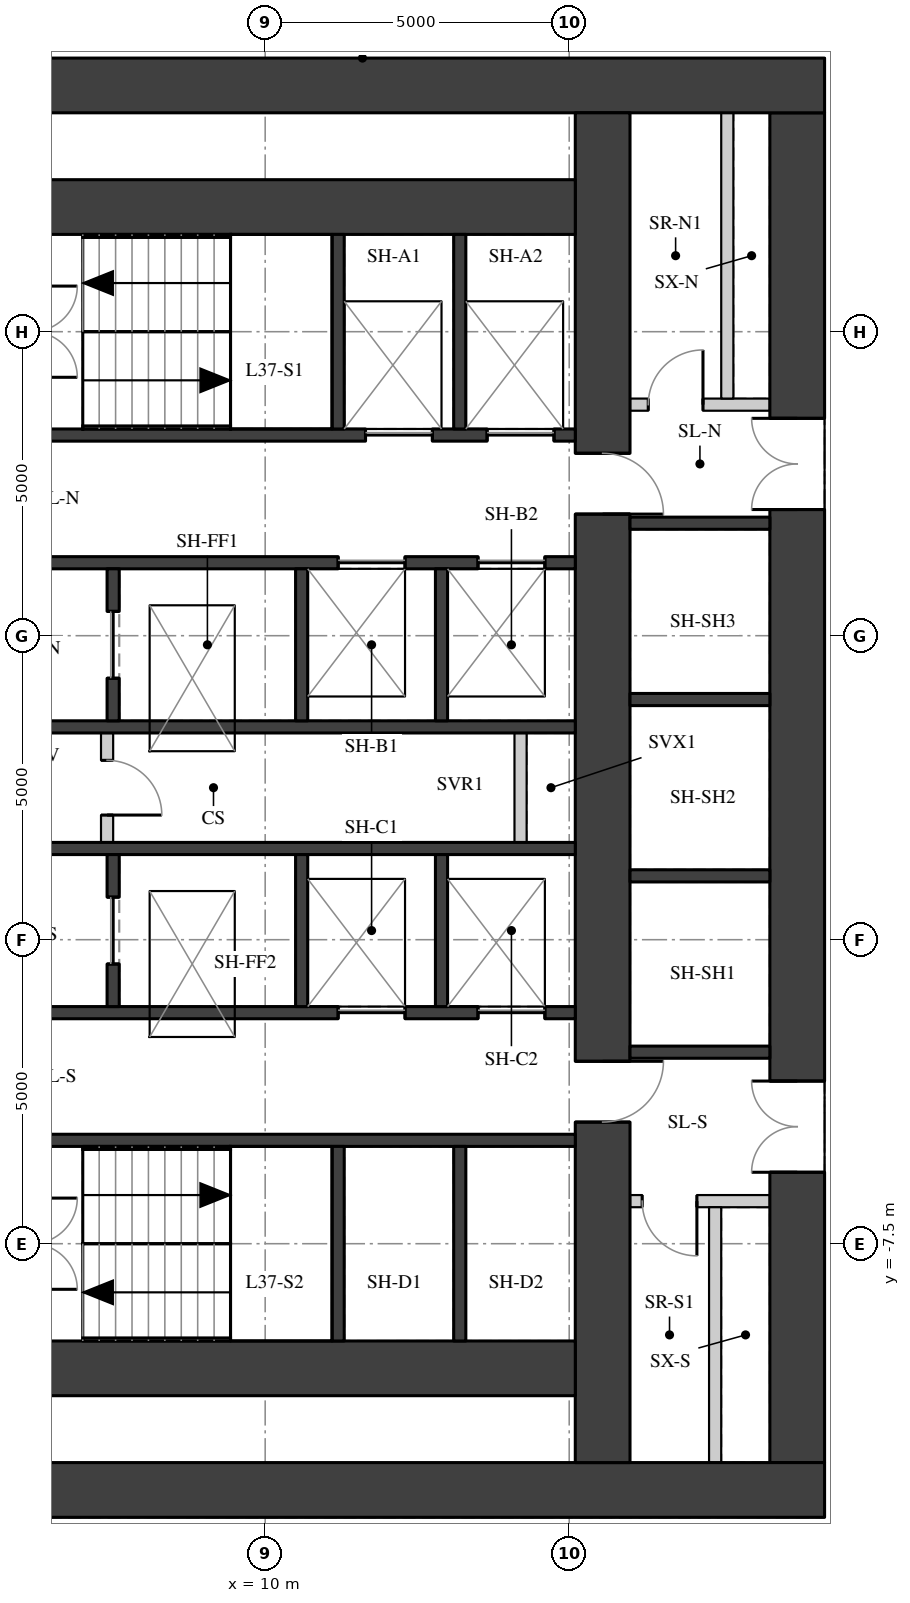
"""IFC4 building model, lengths in metres.
Left out: names, types, materials, properties, quantities, classifications, styles, units other than length and angle.
Written with IfcOpenShell. Run it as: python <this file> out.ifc"""

import sys

from ifc_helpers import new_model, si_unit, direction, frame, frame_2d, origin, place, context, subcontext, project, spatial, rectangle, extrude, element, fill, save


model = new_model("IFC4")
c1 = context("Model", 3, precision=1e-05, world=origin(), true_north=direction((0.0, 1.0)))
c2 = subcontext(c1, "Body", "Model", "MODEL_VIEW")
j1 = project(units=[si_unit("LENGTHUNIT", "METRE"), si_unit("PLANEANGLEUNIT", "RADIAN")], contexts=[c1])
p1 = place(None, origin())
s1 = spatial("IfcSite", under=j1, at=p1, CompositionType="ELEMENT")
p2 = place(p1, origin())
s2 = spatial("IfcBuilding", under=s1, at=p2, CompositionType="ELEMENT")
p3 = place(p2, frame((0.0, 0.0, 131.8)))
s3 = spatial("IfcBuildingStorey", under=s2, at=p3, CompositionType="ELEMENT", Elevation=131.8)
p4 = place(p3, frame((18.75, -11.1, 0.0), z_axis=(0.0, 0.0, 1.0), x_axis=(0.0, 1.0, 0.0)))
e1 = element("IfcWall", 1, at=p4, inside=s3, PredefinedType="SHEAR", context=c2, shape_type="SweptSolid", body=[
    extrude(rectangle(XDim=22.2, YDim=0.9, at=frame_2d((11.1, 0.0))), origin(), (0.0, 0.0, 1.0), 2.85),
])
p5 = place(p4, frame((15.675, 0.0, 0.0)))
e2 = element("IfcOpeningElement", 2, at=p5, cuts=e1, PredefinedType="OPENING", context=c2, shape_type="SweptSolid", body=[
    extrude(rectangle(XDim=1.5, YDim=2.1, at=frame_2d((0.75, 1.05))), frame((0.0, 0.46, 0.0), z_axis=(0.0, -1.0, 0.0), x_axis=(1.0, 0.0, 0.0)), (0.0, 0.0, 1.0), 0.92),
])
p6 = place(p4, frame((4.775, 0.0, 0.0)))
e3 = element("IfcOpeningElement", 3, at=p6, cuts=e1, PredefinedType="OPENING", context=c2, shape_type="SweptSolid", body=[
    extrude(rectangle(XDim=1.5, YDim=2.1, at=frame_2d((0.75, 1.05))), frame((0.0, 0.46, 0.0), z_axis=(0.0, -1.0, 0.0), x_axis=(1.0, 0.0, 0.0)), (0.0, 0.0, 1.0), 0.92),
])
for number, where, z_axis, x_axis in (
    (4, (4.0, 11.55, 0.0), (0.0, 0.0, 1.0), (1.0, 0.0, 0.0)),
    (5, (4.0, -11.55, 0.0), (0.0, 0.0, 1.0), (1.0, 0.0, 0.0)),
):
    element("IfcWall", number, at=place(p3, frame(where, z_axis=z_axis, x_axis=x_axis)), inside=s3, PredefinedType="SHEAR", context=c2, shape_type="SweptSolid", body=[
        extrude(rectangle(XDim=15.2, YDim=0.9, at=frame_2d((7.6, 0.0))), origin(), (0.0, 0.0, 1.0), 2.85),
    ])
p7 = place(p3, frame((15.55, -11.1, 0.0), z_axis=(0.0, 0.0, 1.0), x_axis=(0.0, 1.0, 0.0)))
e6 = element("IfcWall", 6, at=p7, inside=s3, PredefinedType="SHEAR", context=c2, shape_type="SweptSolid", body=[
    extrude(rectangle(XDim=22.2, YDim=0.9, at=frame_2d((11.1, 0.0))), origin(), (0.0, 0.0, 1.0), 2.85),
])
p8 = place(p7, frame((15.6, 0.0, 0.0)))
e7 = element("IfcOpeningElement", 7, at=p8, cuts=e6, PredefinedType="OPENING", context=c2, shape_type="SweptSolid", body=[
    extrude(rectangle(XDim=1.0, YDim=2.1, at=frame_2d((0.5, 1.05))), frame((0.0, 0.46, 0.0), z_axis=(0.0, -1.0, 0.0), x_axis=(1.0, 0.0, 0.0)), (0.0, 0.0, 1.0), 0.92),
])
p9 = place(p7, frame((5.6, 0.0, 0.0)))
e8 = element("IfcOpeningElement", 8, at=p9, cuts=e6, PredefinedType="OPENING", context=c2, shape_type="SweptSolid", body=[
    extrude(rectangle(XDim=1.0, YDim=2.1, at=frame_2d((0.5, 1.05))), frame((0.0, 0.46, 0.0), z_axis=(0.0, -1.0, 0.0), x_axis=(1.0, 0.0, 0.0)), (0.0, 0.0, 1.0), 0.92),
])
for number, where, z_axis, x_axis in (
    (9, (4.9, 9.55, 0.0), (0.0, 0.0, 1.0), (1.0, 0.0, 0.0)),
    (10, (4.9, -9.55, 0.0), (0.0, 0.0, 1.0), (1.0, 0.0, 0.0)),
):
    element("IfcWall", number, at=place(p3, frame(where, z_axis=z_axis, x_axis=x_axis)), inside=s3, PredefinedType="SHEAR", context=c2, shape_type="SweptSolid", body=[
        extrude(rectangle(XDim=10.2, YDim=0.9, at=frame_2d((5.1, 0.0))), origin(), (0.0, 0.0, 1.0), 2.85),
    ])
p10 = place(p3, frame((4.9, 5.8, 0.0), z_axis=(0.0, 0.0, 1.0), x_axis=(1.0, 0.0, 0.0)))
e11 = element("IfcWall", 11, at=p10, inside=s3, PredefinedType="SHEAR", context=c2, shape_type="SweptSolid", body=[
    extrude(rectangle(XDim=10.2, YDim=0.2, at=frame_2d((5.1, 0.0))), origin(), (0.0, 0.0, 1.0), 2.85),
])
p11 = place(p10, frame((6.75, 0.0, 0.0)))
e12 = element("IfcOpeningElement", 12, at=p11, cuts=e11, PredefinedType="OPENING", context=c2, shape_type="SweptSolid", body=[
    extrude(rectangle(XDim=1.1, YDim=2.1, at=frame_2d((0.55, 1.05))), frame((0.0, 0.11, 0.0), z_axis=(0.0, -1.0, 0.0), x_axis=(1.0, 0.0, 0.0)), (0.0, 0.0, 1.0), 0.22),
])
p12 = place(p10, frame((8.75, 0.0, 0.0)))
e13 = element("IfcOpeningElement", 13, at=p12, cuts=e11, PredefinedType="OPENING", context=c2, shape_type="SweptSolid", body=[
    extrude(rectangle(XDim=1.1, YDim=2.1, at=frame_2d((0.55, 1.05))), frame((0.0, 0.11, 0.0), z_axis=(0.0, -1.0, 0.0), x_axis=(1.0, 0.0, 0.0)), (0.0, 0.0, 1.0), 0.22),
])
p13 = place(p3, frame((4.9, 3.7, 0.0), z_axis=(0.0, 0.0, 1.0), x_axis=(1.0, 0.0, 0.0)))
e14 = element("IfcWall", 14, at=p13, inside=s3, PredefinedType="SHEAR", context=c2, shape_type="SweptSolid", body=[
    extrude(rectangle(XDim=10.2, YDim=0.2, at=frame_2d((5.1, 0.0))), origin(), (0.0, 0.0, 1.0), 2.85),
])
p14 = place(p13, frame((6.3, 0.0, 0.0)))
e15 = element("IfcOpeningElement", 15, at=p14, cuts=e14, PredefinedType="OPENING", context=c2, shape_type="SweptSolid", body=[
    extrude(rectangle(XDim=1.1, YDim=2.1, at=frame_2d((0.55, 1.05))), frame((0.0, 0.11, 0.0), z_axis=(0.0, -1.0, 0.0), x_axis=(1.0, 0.0, 0.0)), (0.0, 0.0, 1.0), 0.22),
])
p15 = place(p13, frame((8.6, 0.0, 0.0)))
e16 = element("IfcOpeningElement", 16, at=p15, cuts=e14, PredefinedType="OPENING", context=c2, shape_type="SweptSolid", body=[
    extrude(rectangle(XDim=1.1, YDim=2.1, at=frame_2d((0.55, 1.05))), frame((0.0, 0.11, 0.0), z_axis=(0.0, -1.0, 0.0), x_axis=(1.0, 0.0, 0.0)), (0.0, 0.0, 1.0), 0.22),
])
for number, where, z_axis, x_axis in (
    (17, (4.9, 1.0, 0.0), (0.0, 0.0, 1.0), (1.0, 0.0, 0.0)),
    (18, (4.9, -1.0, 0.0), (0.0, 0.0, 1.0), (1.0, 0.0, 0.0)),
):
    element("IfcWall", number, at=place(p3, frame(where, z_axis=z_axis, x_axis=x_axis)), inside=s3, PredefinedType="SHEAR", context=c2, shape_type="SweptSolid", body=[
        extrude(rectangle(XDim=10.2, YDim=0.2, at=frame_2d((5.1, 0.0))), origin(), (0.0, 0.0, 1.0), 2.85),
    ])
p16 = place(p3, frame((4.9, -3.7, 0.0), z_axis=(0.0, 0.0, 1.0), x_axis=(1.0, 0.0, 0.0)))
e19 = element("IfcWall", 19, at=p16, inside=s3, PredefinedType="SHEAR", context=c2, shape_type="SweptSolid", body=[
    extrude(rectangle(XDim=10.2, YDim=0.2, at=frame_2d((5.1, 0.0))), origin(), (0.0, 0.0, 1.0), 2.85),
])
p17 = place(p16, frame((6.3, 0.0, 0.0)))
e20 = element("IfcOpeningElement", 20, at=p17, cuts=e19, PredefinedType="OPENING", context=c2, shape_type="SweptSolid", body=[
    extrude(rectangle(XDim=1.1, YDim=2.1, at=frame_2d((0.55, 1.05))), frame((0.0, 0.11, 0.0), z_axis=(0.0, -1.0, 0.0), x_axis=(1.0, 0.0, 0.0)), (0.0, 0.0, 1.0), 0.22),
])
p18 = place(p16, frame((8.6, 0.0, 0.0)))
e21 = element("IfcOpeningElement", 21, at=p18, cuts=e19, PredefinedType="OPENING", context=c2, shape_type="SweptSolid", body=[
    extrude(rectangle(XDim=1.1, YDim=2.1, at=frame_2d((0.55, 1.05))), frame((0.0, 0.11, 0.0), z_axis=(0.0, -1.0, 0.0), x_axis=(1.0, 0.0, 0.0)), (0.0, 0.0, 1.0), 0.22),
])
p19 = place(p3, frame((4.9, -5.8, 0.0), z_axis=(0.0, 0.0, 1.0), x_axis=(1.0, 0.0, 0.0)))
e22 = element("IfcWall", 22, at=p19, inside=s3, PredefinedType="SHEAR", context=c2, shape_type="SweptSolid", body=[
    extrude(rectangle(XDim=10.2, YDim=0.2, at=frame_2d((5.1, 0.0))), origin(), (0.0, 0.0, 1.0), 2.85),
])
for number, where, z_axis, x_axis in (
    (23, (11.2, 5.9, 0.0), (0.0, 0.0, 1.0), (0.0, 1.0, 0.0)),
    (24, (11.2, -9.1, 0.0), (0.0, 0.0, 1.0), (0.0, 1.0, 0.0)),
    (25, (13.2, 5.9, 0.0), (0.0, 0.0, 1.0), (0.0, 1.0, 0.0)),
    (26, (13.2, -9.1, 0.0), (0.0, 0.0, 1.0), (0.0, 1.0, 0.0)),
):
    element("IfcWall", number, at=place(p3, frame(where, z_axis=z_axis, x_axis=x_axis)), inside=s3, PredefinedType="SHEAR", context=c2, shape_type="SweptSolid", body=[
        extrude(rectangle(XDim=3.2, YDim=0.2, at=frame_2d((1.6, 0.0))), origin(), (0.0, 0.0, 1.0), 2.85),
    ])
p20 = place(p3, frame((7.5, 1.1, 0.0), z_axis=(0.0, 0.0, 1.0), x_axis=(0.0, 1.0, 0.0)))
e27 = element("IfcWall", 27, at=p20, inside=s3, PredefinedType="SHEAR", context=c2, shape_type="SweptSolid", body=[
    extrude(rectangle(XDim=2.5, YDim=0.2, at=frame_2d((1.25, 0.0))), origin(), (0.0, 0.0, 1.0), 2.85),
])
p21 = place(p20, frame((0.7, 0.0, 0.0)))
e28 = element("IfcOpeningElement", 28, at=p21, cuts=e27, PredefinedType="OPENING", context=c2, shape_type="SweptSolid", body=[
    extrude(rectangle(XDim=1.1, YDim=2.1, at=frame_2d((0.55, 1.05))), frame((0.0, 0.11, 0.0), z_axis=(0.0, -1.0, 0.0), x_axis=(1.0, 0.0, 0.0)), (0.0, 0.0, 1.0), 0.22),
])
p22 = place(p3, frame((7.5, -3.6, 0.0), z_axis=(0.0, 0.0, 1.0), x_axis=(0.0, 1.0, 0.0)))
e29 = element("IfcWall", 29, at=p22, inside=s3, PredefinedType="SHEAR", context=c2, shape_type="SweptSolid", body=[
    extrude(rectangle(XDim=2.5, YDim=0.2, at=frame_2d((1.25, 0.0))), origin(), (0.0, 0.0, 1.0), 2.85),
])
p23 = place(p22, frame((0.7, 0.0, 0.0)))
e30 = element("IfcOpeningElement", 30, at=p23, cuts=e29, PredefinedType="OPENING", context=c2, shape_type="SweptSolid", body=[
    extrude(rectangle(XDim=1.1, YDim=2.1, at=frame_2d((0.55, 1.05))), frame((0.0, 0.11, 0.0), z_axis=(0.0, -1.0, 0.0), x_axis=(1.0, 0.0, 0.0)), (0.0, 0.0, 1.0), 0.22),
])
for number, where, z_axis, x_axis in (
    (31, (10.6, 1.1, 0.0), (0.0, 0.0, 1.0), (0.0, 1.0, 0.0)),
    (32, (10.6, -3.6, 0.0), (0.0, 0.0, 1.0), (0.0, 1.0, 0.0)),
    (33, (12.9, 1.1, 0.0), (0.0, 0.0, 1.0), (0.0, 1.0, 0.0)),
    (34, (12.9, -3.6, 0.0), (0.0, 0.0, 1.0), (0.0, 1.0, 0.0)),
):
    element("IfcWall", number, at=place(p3, frame(where, z_axis=z_axis, x_axis=x_axis)), inside=s3, PredefinedType="SHEAR", context=c2, shape_type="SweptSolid", body=[
        extrude(rectangle(XDim=2.5, YDim=0.2, at=frame_2d((1.25, 0.0))), origin(), (0.0, 0.0, 1.0), 2.85),
    ])
p24 = place(p3, frame((7.4, -0.9, 0.0), z_axis=(0.0, 0.0, 1.0), x_axis=(0.0, 1.0, 0.0)))
e35 = element("IfcWall", 35, at=p24, inside=s3, PredefinedType="PARTITIONING", context=c2, shape_type="SweptSolid", body=[
    extrude(rectangle(XDim=1.8, YDim=0.2, at=frame_2d((0.9, 0.0))), origin(), (0.0, 0.0, 1.0), 2.85),
])
p25 = place(p24, frame((0.45, 0.0, 0.0)))
e36 = element("IfcOpeningElement", 36, at=p25, cuts=e35, PredefinedType="OPENING", context=c2, shape_type="SweptSolid", body=[
    extrude(rectangle(XDim=0.9, YDim=2.1, at=frame_2d((0.45, 1.05))), frame((0.0, 0.11, 0.0), z_axis=(0.0, -1.0, 0.0), x_axis=(1.0, 0.0, 0.0)), (0.0, 0.0, 1.0), 0.22),
])
p26 = place(p3, frame((14.2, -0.9, 0.0), z_axis=(0.0, 0.0, 1.0), x_axis=(0.0, 1.0, 0.0)))
e37 = element("IfcWall", 37, at=p26, inside=s3, PredefinedType="PARTITIONING", context=c2, shape_type="SweptSolid", body=[
    extrude(rectangle(XDim=1.8, YDim=0.2, at=frame_2d((0.9, 0.0))), origin(), (0.0, 0.0, 1.0), 2.85),
])
for number, where, z_axis, x_axis in (
    (38, (16.0, -4.35, 0.0), (0.0, 0.0, 1.0), (1.0, 0.0, 0.0)),
    (39, (16.0, -1.45, 0.0), (0.0, 0.0, 1.0), (1.0, 0.0, 0.0)),
    (40, (16.0, 1.45, 0.0), (0.0, 0.0, 1.0), (1.0, 0.0, 0.0)),
    (41, (16.0, 4.35, 0.0), (0.0, 0.0, 1.0), (1.0, 0.0, 0.0)),
):
    element("IfcWall", number, at=place(p3, frame(where, z_axis=z_axis, x_axis=x_axis)), inside=s3, PredefinedType="SHEAR", context=c2, shape_type="SweptSolid", body=[
        extrude(rectangle(XDim=2.3, YDim=0.2, at=frame_2d((1.15, 0.0))), origin(), (0.0, 0.0, 1.0), 2.85),
    ])
p27 = place(p3, frame((16.0, 6.3, 0.0), z_axis=(0.0, 0.0, 1.0), x_axis=(1.0, 0.0, 0.0)))
e42 = element("IfcWall", 42, at=p27, inside=s3, PredefinedType="PARTITIONING", context=c2, shape_type="SweptSolid", body=[
    extrude(rectangle(XDim=2.3, YDim=0.2, at=frame_2d((1.15, 0.0))), origin(), (0.0, 0.0, 1.0), 2.85),
])
p28 = place(p27, frame((0.3, 0.0, 0.0)))
e43 = element("IfcOpeningElement", 43, at=p28, cuts=e42, PredefinedType="OPENING", context=c2, shape_type="SweptSolid", body=[
    extrude(rectangle(XDim=0.9, YDim=2.1, at=frame_2d((0.45, 1.05))), frame((0.0, 0.11, 0.0), z_axis=(0.0, -1.0, 0.0), x_axis=(1.0, 0.0, 0.0)), (0.0, 0.0, 1.0), 0.22),
])
p29 = place(p3, frame((17.6, 6.4, 0.0), z_axis=(0.0, 0.0, 1.0), x_axis=(0.0, 1.0, 0.0)))
e44 = element("IfcWall", 44, at=p29, inside=s3, PredefinedType="PARTITIONING", context=c2, shape_type="SweptSolid", body=[
    extrude(rectangle(XDim=4.7, YDim=0.2, at=frame_2d((2.35, 0.0))), origin(), (0.0, 0.0, 1.0), 2.85),
])
p30 = place(p3, frame((16.0, -6.8, 0.0), z_axis=(0.0, 0.0, 1.0), x_axis=(1.0, 0.0, 0.0)))
e45 = element("IfcWall", 45, at=p30, inside=s3, PredefinedType="PARTITIONING", context=c2, shape_type="SweptSolid", body=[
    extrude(rectangle(XDim=2.3, YDim=0.2, at=frame_2d((1.15, 0.0))), origin(), (0.0, 0.0, 1.0), 2.85),
])
p31 = place(p30, frame((0.2, 0.0, 0.0)))
e46 = element("IfcOpeningElement", 46, at=p31, cuts=e45, PredefinedType="OPENING", context=c2, shape_type="SweptSolid", body=[
    extrude(rectangle(XDim=0.9, YDim=2.1, at=frame_2d((0.45, 1.05))), frame((0.0, 0.11, 0.0), z_axis=(0.0, -1.0, 0.0), x_axis=(1.0, 0.0, 0.0)), (0.0, 0.0, 1.0), 0.22),
])
p32 = place(p3, frame((17.4, -11.1, 0.0), z_axis=(0.0, 0.0, 1.0), x_axis=(0.0, 1.0, 0.0)))
e47 = element("IfcWall", 47, at=p32, inside=s3, PredefinedType="PARTITIONING", context=c2, shape_type="SweptSolid", body=[
    extrude(rectangle(XDim=4.2, YDim=0.2, at=frame_2d((2.1, 0.0))), origin(), (0.0, 0.0, 1.0), 2.85),
])
p33 = place(p5, origin())
e48 = element("IfcDoor", 48, at=p33, inside=s3, OperationType="DOUBLE_DOOR_SINGLE_SWING", PredefinedType="DOOR", context=c2, shape_type="SweptSolid", body=[
    extrude(rectangle(XDim=1.5, YDim=2.1, at=frame_2d((0.75, 1.05))), frame((0.0, 0.025, 0.0), z_axis=(0.0, -1.0, 0.0), x_axis=(1.0, 0.0, 0.0)), (0.0, 0.0, 1.0), 0.05),
])
fill(e2, e48)
p34 = place(p6, origin())
e49 = element("IfcDoor", 49, at=p34, inside=s3, OperationType="DOUBLE_DOOR_SINGLE_SWING", PredefinedType="DOOR", context=c2, shape_type="SweptSolid", body=[
    extrude(rectangle(XDim=1.5, YDim=2.1, at=frame_2d((0.75, 1.05))), frame((0.0, 0.025, 0.0), z_axis=(0.0, -1.0, 0.0), x_axis=(1.0, 0.0, 0.0)), (0.0, 0.0, 1.0), 0.05),
])
fill(e3, e49)
p35 = place(p11, origin())
e50 = element("IfcDoor", 50, at=p35, inside=s3, OperationType="DOUBLE_DOOR_SLIDING", PredefinedType="DOOR", context=c2, shape_type="SweptSolid", body=[
    extrude(rectangle(XDim=1.1, YDim=2.1, at=frame_2d((0.55, 1.05))), frame((0.0, 0.025, 0.0), z_axis=(0.0, -1.0, 0.0), x_axis=(1.0, 0.0, 0.0)), (0.0, 0.0, 1.0), 0.05),
])
fill(e12, e50)
p36 = place(p12, origin())
e51 = element("IfcDoor", 51, at=p36, inside=s3, OperationType="DOUBLE_DOOR_SLIDING", PredefinedType="DOOR", context=c2, shape_type="SweptSolid", body=[
    extrude(rectangle(XDim=1.1, YDim=2.1, at=frame_2d((0.55, 1.05))), frame((0.0, 0.025, 0.0), z_axis=(0.0, -1.0, 0.0), x_axis=(1.0, 0.0, 0.0)), (0.0, 0.0, 1.0), 0.05),
])
fill(e13, e51)
p37 = place(p14, origin())
e52 = element("IfcDoor", 52, at=p37, inside=s3, OperationType="DOUBLE_DOOR_SLIDING", PredefinedType="DOOR", context=c2, shape_type="SweptSolid", body=[
    extrude(rectangle(XDim=1.1, YDim=2.1, at=frame_2d((0.55, 1.05))), frame((0.0, 0.025, 0.0), z_axis=(0.0, -1.0, 0.0), x_axis=(1.0, 0.0, 0.0)), (0.0, 0.0, 1.0), 0.05),
])
fill(e15, e52)
p38 = place(p15, origin())
e53 = element("IfcDoor", 53, at=p38, inside=s3, OperationType="DOUBLE_DOOR_SLIDING", PredefinedType="DOOR", context=c2, shape_type="SweptSolid", body=[
    extrude(rectangle(XDim=1.1, YDim=2.1, at=frame_2d((0.55, 1.05))), frame((0.0, 0.025, 0.0), z_axis=(0.0, -1.0, 0.0), x_axis=(1.0, 0.0, 0.0)), (0.0, 0.0, 1.0), 0.05),
])
fill(e16, e53)
p39 = place(p17, origin())
e54 = element("IfcDoor", 54, at=p39, inside=s3, OperationType="DOUBLE_DOOR_SLIDING", PredefinedType="DOOR", context=c2, shape_type="SweptSolid", body=[
    extrude(rectangle(XDim=1.1, YDim=2.1, at=frame_2d((0.55, 1.05))), frame((0.0, 0.025, 0.0), z_axis=(0.0, -1.0, 0.0), x_axis=(1.0, 0.0, 0.0)), (0.0, 0.0, 1.0), 0.05),
])
fill(e20, e54)
p40 = place(p18, origin())
e55 = element("IfcDoor", 55, at=p40, inside=s3, OperationType="DOUBLE_DOOR_SLIDING", PredefinedType="DOOR", context=c2, shape_type="SweptSolid", body=[
    extrude(rectangle(XDim=1.1, YDim=2.1, at=frame_2d((0.55, 1.05))), frame((0.0, 0.025, 0.0), z_axis=(0.0, -1.0, 0.0), x_axis=(1.0, 0.0, 0.0)), (0.0, 0.0, 1.0), 0.05),
])
fill(e21, e55)
p41 = place(p21, origin())
e56 = element("IfcDoor", 56, at=p41, inside=s3, OperationType="DOUBLE_DOOR_SLIDING", PredefinedType="DOOR", context=c2, shape_type="SweptSolid", body=[
    extrude(rectangle(XDim=1.1, YDim=2.1, at=frame_2d((0.55, 1.05))), frame((0.0, 0.025, 0.0), z_axis=(0.0, -1.0, 0.0), x_axis=(1.0, 0.0, 0.0)), (0.0, 0.0, 1.0), 0.05),
])
fill(e28, e56)
p42 = place(p23, origin())
e57 = element("IfcDoor", 57, at=p42, inside=s3, OperationType="DOUBLE_DOOR_SLIDING", PredefinedType="DOOR", context=c2, shape_type="SweptSolid", body=[
    extrude(rectangle(XDim=1.1, YDim=2.1, at=frame_2d((0.55, 1.05))), frame((0.0, 0.025, 0.0), z_axis=(0.0, -1.0, 0.0), x_axis=(1.0, 0.0, 0.0)), (0.0, 0.0, 1.0), 0.05),
])
fill(e30, e57)
p43 = place(p25, origin())
e58 = element("IfcDoor", 58, at=p43, inside=s3, OperationType="SINGLE_SWING_RIGHT", PredefinedType="DOOR", context=c2, shape_type="SweptSolid", body=[
    extrude(rectangle(XDim=0.9, YDim=2.1, at=frame_2d((0.45, 1.05))), frame((0.0, 0.025, 0.0), z_axis=(0.0, -1.0, 0.0), x_axis=(1.0, 0.0, 0.0)), (0.0, 0.0, 1.0), 0.05),
])
fill(e36, e58)
p44 = place(p8, origin())
e59 = element("IfcDoor", 59, at=p44, inside=s3, OperationType="SINGLE_SWING_RIGHT", PredefinedType="DOOR", context=c2, shape_type="SweptSolid", body=[
    extrude(rectangle(XDim=1.0, YDim=2.1, at=frame_2d((0.5, 1.05))), frame((0.0, 0.025, 0.0), z_axis=(0.0, -1.0, 0.0), x_axis=(1.0, 0.0, 0.0)), (0.0, 0.0, 1.0), 0.05),
])
fill(e7, e59)
p45 = place(p28, origin())
e60 = element("IfcDoor", 60, at=p45, inside=s3, OperationType="SINGLE_SWING_RIGHT", PredefinedType="DOOR", context=c2, shape_type="SweptSolid", body=[
    extrude(rectangle(XDim=0.9, YDim=2.1, at=frame_2d((0.45, 1.05))), frame((0.0, 0.025, 0.0), z_axis=(0.0, -1.0, 0.0), x_axis=(1.0, 0.0, 0.0)), (0.0, 0.0, 1.0), 0.05),
])
fill(e43, e60)
p46 = place(p9, origin())
e61 = element("IfcDoor", 61, at=p46, inside=s3, OperationType="SINGLE_SWING_LEFT", PredefinedType="DOOR", context=c2, shape_type="SweptSolid", body=[
    extrude(rectangle(XDim=1.0, YDim=2.1, at=frame_2d((0.5, 1.05))), frame((0.0, 0.025, 0.0), z_axis=(0.0, -1.0, 0.0), x_axis=(1.0, 0.0, 0.0)), (0.0, 0.0, 1.0), 0.05),
])
fill(e8, e61)
p47 = place(p31, origin())
e62 = element("IfcDoor", 62, at=p47, inside=s3, OperationType="SINGLE_SWING_LEFT", PredefinedType="DOOR", context=c2, shape_type="SweptSolid", body=[
    extrude(rectangle(XDim=0.9, YDim=2.1, at=frame_2d((0.45, 1.05))), frame((0.0, 0.025, 0.0), z_axis=(0.0, -1.0, 0.0), x_axis=(1.0, 0.0, 0.0)), (0.0, 0.0, 1.0), 0.05),
])
fill(e46, e62)
save(model, sys.argv[1])
